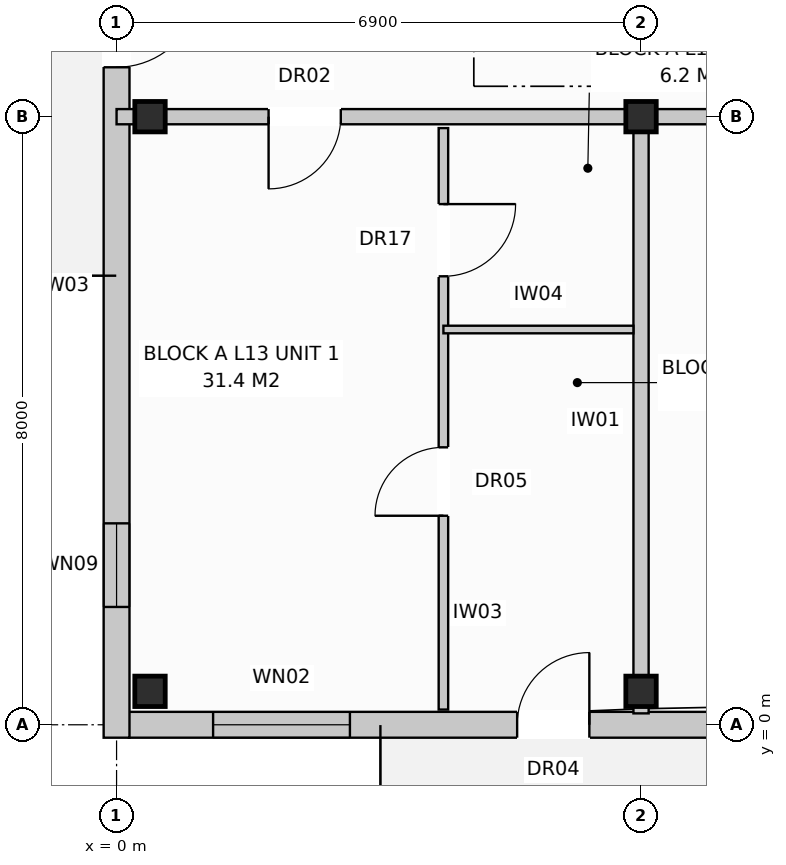
"""IFC4 building model, lengths in metres.
Left out: names, types, materials, properties, quantities, classifications, styles, units other than length and angle.
Written with IfcOpenShell. Run it as: python <this file> out.ifc"""

import sys

from ifc_helpers import new_model, si_unit, direction, frame, frame_2d, origin, origin_with_axes, origin_2d, place, context, subcontext, project, spatial, rectangle, extrude, element, fill, save


model = new_model("IFC4")
c1 = context("Model", 3, precision=1e-05, world=origin(), true_north=direction((0.0, 1.0)))
c2 = subcontext(c1, "Body", "Model", "MODEL_VIEW")
j1 = project(units=[si_unit("LENGTHUNIT", "METRE"), si_unit("PLANEANGLEUNIT", "RADIAN")], contexts=[c1])
p1 = place(None, origin())
s1 = spatial("IfcSite", under=j1, at=p1, CompositionType="ELEMENT")
p2 = place(p1, origin())
s2 = spatial("IfcBuilding", under=s1, at=p2, CompositionType="ELEMENT")
p3 = place(p2, frame((0.0, 0.0, 43.2)))
s3 = spatial("IfcBuildingStorey", under=s2, at=p3, CompositionType="ELEMENT", Elevation=43.2)
for number, where, z_axis, x_axis in (
    (1, (0.44, 0.44, 0.0), (0.0, 0.0, 1.0), (1.0, 0.0, 0.0)),
    (2, (0.44, 8.0, 0.0), (0.0, 0.0, 1.0), (1.0, 0.0, 0.0)),
    (3, (6.9, 0.44, 0.0), (0.0, 0.0, 1.0), (1.0, 0.0, 0.0)),
    (4, (6.9, 8.0, 0.0), (0.0, 0.0, 1.0), (1.0, 0.0, 0.0)),
):
    element("IfcColumn", number, at=place(p3, frame(where, z_axis=z_axis, x_axis=x_axis)), inside=s3, PredefinedType="COLUMN", context=c2, shape_type="SweptSolid", body=[
        extrude(rectangle(XDim=0.4, YDim=0.4, at=origin_2d()), origin(), (0.0, 0.0, 1.0), 3.2),
    ])
p4 = place(p3, frame((0.16, 0.0, 0.0), z_axis=(0.0, 0.0, 1.0), x_axis=(1.0, 0.0, 0.0)))
e5 = element("IfcWall", 5, at=p4, inside=s3, PredefinedType="STANDARD", context=c2, shape_type="SweptSolid", body=[
    extrude(rectangle(XDim=41.08, YDim=0.34, at=frame_2d((20.54, 0.0))), origin(), (0.0, 0.0, 1.0), 2.97),
])
p5 = place(p4, frame((5.11, 0.0, 0.0)))
e6 = element("IfcOpeningElement", 6, at=p5, cuts=e5, PredefinedType="OPENING", context=c2, shape_type="SweptSolid", body=[
    extrude(rectangle(XDim=0.95, YDim=2.1, at=frame_2d((0.475, 1.05))), frame((0.0, 0.182, 0.0), z_axis=(0.0, -1.0, 0.0), x_axis=(1.0, 0.0, 0.0)), (0.0, 0.0, 1.0), 0.364),
])
p6 = place(p4, frame((18.91, 0.0, 0.0)))
e7 = element("IfcOpeningElement", 7, at=p6, cuts=e5, PredefinedType="OPENING", context=c2, shape_type="SweptSolid", body=[
    extrude(rectangle(XDim=0.95, YDim=2.1, at=frame_2d((0.475, 1.05))), frame((0.0, 0.182, 0.0), z_axis=(0.0, -1.0, 0.0), x_axis=(1.0, 0.0, 0.0)), (0.0, 0.0, 1.0), 0.364),
])
p7 = place(p4, frame((31.431, 0.0, 0.0)))
e8 = element("IfcOpeningElement", 8, at=p7, cuts=e5, PredefinedType="OPENING", context=c2, shape_type="SweptSolid", body=[
    extrude(rectangle(XDim=0.95, YDim=2.1, at=frame_2d((0.475, 1.05))), frame((0.0, 0.182, 0.0), z_axis=(0.0, -1.0, 0.0), x_axis=(1.0, 0.0, 0.0)), (0.0, 0.0, 1.0), 0.364),
])
p8 = place(p4, frame((1.11, 0.0, 0.8)))
e9 = element("IfcOpeningElement", 9, at=p8, cuts=e5, PredefinedType="OPENING", context=c2, shape_type="SweptSolid", body=[
    extrude(rectangle(XDim=1.8, YDim=1.7, at=frame_2d((0.9, 0.85))), frame((0.0, 0.182, 0.0), z_axis=(0.0, -1.0, 0.0), x_axis=(1.0, 0.0, 0.0)), (0.0, 0.0, 1.0), 0.364),
])
p9 = place(p4, frame((9.36, 0.0, 0.72)))
e10 = element("IfcOpeningElement", 10, at=p9, cuts=e5, PredefinedType="OPENING", context=c2, shape_type="SweptSolid", body=[
    extrude(rectangle(XDim=1.1, YDim=1.5, at=frame_2d((0.55, 0.75))), frame((0.0, 0.182, 0.0), z_axis=(0.0, -1.0, 0.0), x_axis=(1.0, 0.0, 0.0)), (0.0, 0.0, 1.0), 0.364),
])
p10 = place(p4, frame((14.635, 0.0, 0.8)))
e11 = element("IfcOpeningElement", 11, at=p10, cuts=e5, PredefinedType="OPENING", context=c2, shape_type="SweptSolid", body=[
    extrude(rectangle(XDim=1.95, YDim=1.65, at=frame_2d((0.975, 0.825))), frame((0.0, 0.182, 0.0), z_axis=(0.0, -1.0, 0.0), x_axis=(1.0, 0.0, 0.0)), (0.0, 0.0, 1.0), 0.364),
])
p11 = place(p4, frame((21.46, 0.0, 0.72)))
e12 = element("IfcOpeningElement", 12, at=p11, cuts=e5, PredefinedType="OPENING", context=c2, shape_type="SweptSolid", body=[
    extrude(rectangle(XDim=1.1, YDim=1.5, at=frame_2d((0.55, 0.75))), frame((0.0, 0.182, 0.0), z_axis=(0.0, -1.0, 0.0), x_axis=(1.0, 0.0, 0.0)), (0.0, 0.0, 1.0), 0.364),
])
p12 = place(p4, frame((24.46, 0.0, 0.8)))
e13 = element("IfcOpeningElement", 13, at=p12, cuts=e5, PredefinedType="OPENING", context=c2, shape_type="SweptSolid", body=[
    extrude(rectangle(XDim=1.9, YDim=1.85, at=frame_2d((0.95, 0.925))), frame((0.0, 0.182, 0.0), z_axis=(0.0, -1.0, 0.0), x_axis=(1.0, 0.0, 0.0)), (0.0, 0.0, 1.0), 0.364),
])
p13 = place(p4, frame((29.135, 0.0, 0.8)))
e14 = element("IfcOpeningElement", 14, at=p13, cuts=e5, PredefinedType="OPENING", context=c2, shape_type="SweptSolid", body=[
    extrude(rectangle(XDim=1.95, YDim=1.65, at=frame_2d((0.975, 0.825))), frame((0.0, 0.182, 0.0), z_axis=(0.0, -1.0, 0.0), x_axis=(1.0, 0.0, 0.0)), (0.0, 0.0, 1.0), 0.364),
])
p14 = place(p4, frame((35.26, 0.0, 0.72)))
e15 = element("IfcOpeningElement", 15, at=p14, cuts=e5, PredefinedType="OPENING", context=c2, shape_type="SweptSolid", body=[
    extrude(rectangle(XDim=1.1, YDim=1.5, at=frame_2d((0.55, 0.75))), frame((0.0, 0.182, 0.0), z_axis=(0.0, -1.0, 0.0), x_axis=(1.0, 0.0, 0.0)), (0.0, 0.0, 1.0), 0.364),
])
p15 = place(p4, frame((38.06, 0.0, 0.8)))
e16 = element("IfcOpeningElement", 16, at=p15, cuts=e5, PredefinedType="OPENING", context=c2, shape_type="SweptSolid", body=[
    extrude(rectangle(XDim=1.9, YDim=1.85, at=frame_2d((0.95, 0.925))), frame((0.0, 0.182, 0.0), z_axis=(0.0, -1.0, 0.0), x_axis=(1.0, 0.0, 0.0)), (0.0, 0.0, 1.0), 0.364),
])
p16 = place(p3, frame((0.0, -0.17, 0.0), z_axis=(0.0, 0.0, 1.0), x_axis=(0.0, 1.0, 0.0)))
e17 = element("IfcWall", 17, at=p16, inside=s3, PredefinedType="STANDARD", context=c2, shape_type="SweptSolid", body=[
    extrude(rectangle(XDim=18.74, YDim=0.34, at=frame_2d((9.37, 0.0))), origin(), (0.0, 0.0, 1.0), 2.97),
])
p17 = place(p16, frame((8.82, 0.0, 0.0)))
e18 = element("IfcOpeningElement", 18, at=p17, cuts=e17, PredefinedType="OPENING", context=c2, shape_type="SweptSolid", body=[
    extrude(rectangle(XDim=1.1, YDim=2.1, at=frame_2d((0.55, 1.05))), frame((0.0, 0.182, 0.0), z_axis=(0.0, -1.0, 0.0), x_axis=(1.0, 0.0, 0.0)), (0.0, 0.0, 1.0), 0.364),
])
p18 = place(p16, frame((1.72, 0.0, 0.72)))
e19 = element("IfcOpeningElement", 19, at=p18, cuts=e17, PredefinedType="OPENING", context=c2, shape_type="SweptSolid", body=[
    extrude(rectangle(XDim=1.1, YDim=1.5, at=frame_2d((0.55, 0.75))), frame((0.0, 0.182, 0.0), z_axis=(0.0, -1.0, 0.0), x_axis=(1.0, 0.0, 0.0)), (0.0, 0.0, 1.0), 0.364),
])
p19 = place(p16, frame((15.92, 0.0, 0.72)))
e20 = element("IfcOpeningElement", 20, at=p19, cuts=e17, PredefinedType="OPENING", context=c2, shape_type="SweptSolid", body=[
    extrude(rectangle(XDim=1.1, YDim=1.5, at=frame_2d((0.55, 0.75))), frame((0.0, 0.182, 0.0), z_axis=(0.0, -1.0, 0.0), x_axis=(1.0, 0.0, 0.0)), (0.0, 0.0, 1.0), 0.364),
])
p20 = place(p3, frame((6.9, 7.85, 0.0), z_axis=(0.0, 0.0, 1.0), x_axis=(0.0, -1.0, 0.0)))
e21 = element("IfcWall", 21, at=p20, inside=s3, PredefinedType="PARTITIONING", context=c2, shape_type="SweptSolid", body=[
    extrude(rectangle(XDim=7.7, YDim=0.2, at=frame_2d((3.85, 0.0))), origin(), (0.0, 0.0, 1.0), 2.41),
])
p21 = place(p3, frame((0.0, 8.0, 0.0), z_axis=(0.0, 0.0, 1.0), x_axis=(1.0, 0.0, 0.0)))
e22 = element("IfcWall", 22, at=p21, inside=s3, PredefinedType="PARTITIONING", context=c2, shape_type="SweptSolid", body=[
    extrude(rectangle(XDim=6.9, YDim=0.2, at=frame_2d((3.45, 0.0))), origin(), (0.0, 0.0, 1.0), 2.41),
])
p22 = place(p21, frame((2.0, 0.0, 0.0)))
e23 = element("IfcOpeningElement", 23, at=p22, cuts=e22, PredefinedType="OPENING", context=c2, shape_type="SweptSolid", body=[
    extrude(rectangle(XDim=0.95, YDim=2.15, at=frame_2d((0.475, 1.075))), frame((0.0, 0.112, 0.0), z_axis=(0.0, -1.0, 0.0), x_axis=(1.0, 0.0, 0.0)), (0.0, 0.0, 1.0), 0.224),
])
p23 = place(p3, frame((4.3, 7.85, 0.0), z_axis=(0.0, 0.0, 1.0), x_axis=(0.0, -1.0, 0.0)))
e24 = element("IfcWall", 24, at=p23, inside=s3, PredefinedType="PARTITIONING", context=c2, shape_type="SweptSolid", body=[
    extrude(rectangle(XDim=7.65, YDim=0.125, at=frame_2d((3.825, 0.0))), origin(), (0.0, 0.0, 1.0), 2.59),
])
p24 = place(p23, frame((1.0, 0.0, 0.0)))
e25 = element("IfcOpeningElement", 25, at=p24, cuts=e24, PredefinedType="OPENING", context=c2, shape_type="SweptSolid", body=[
    extrude(rectangle(XDim=0.95, YDim=2.1, at=frame_2d((0.475, 1.05))), frame((0.0, 0.074, 0.0), z_axis=(0.0, -1.0, 0.0), x_axis=(1.0, 0.0, 0.0)), (0.0, 0.0, 1.0), 0.149),
])
p25 = place(p23, frame((4.2, 0.0, 0.0)))
e26 = element("IfcOpeningElement", 26, at=p25, cuts=e24, PredefinedType="OPENING", context=c2, shape_type="SweptSolid", body=[
    extrude(rectangle(XDim=0.9, YDim=2.1, at=frame_2d((0.45, 1.05))), frame((0.0, 0.074, 0.0), z_axis=(0.0, -1.0, 0.0), x_axis=(1.0, 0.0, 0.0)), (0.0, 0.0, 1.0), 0.149),
])
p26 = place(p3, frame((4.3, 5.2, 0.0), z_axis=(0.0, 0.0, 1.0), x_axis=(1.0, 0.0, 0.0)))
e27 = element("IfcWall", 27, at=p26, inside=s3, PredefinedType="PARTITIONING", context=c2, shape_type="SweptSolid", body=[
    extrude(rectangle(XDim=2.5, YDim=0.1, at=frame_2d((1.25, 0.0))), origin(), (0.0, 0.0, 1.0), 2.97),
])
p27 = place(p3, frame((6.9, 8.0, 0.0), z_axis=(0.0, 0.0, 1.0), x_axis=(1.0, 0.0, 0.0)))
e28 = element("IfcWall", 28, at=p27, inside=s3, PredefinedType="PARTITIONING", context=c2, shape_type="SweptSolid", body=[
    extrude(rectangle(XDim=20.7, YDim=0.2, at=frame_2d((10.35, 0.0))), origin(), (0.0, 0.0, 1.0), 2.41),
])
p28 = place(p27, frame((2.4, 0.0, 0.0)))
e29 = element("IfcOpeningElement", 29, at=p28, cuts=e28, PredefinedType="OPENING", context=c2, shape_type="SweptSolid", body=[
    extrude(rectangle(XDim=0.95, YDim=2.15, at=frame_2d((0.475, 1.075))), frame((0.0, 0.112, 0.0), z_axis=(0.0, -1.0, 0.0), x_axis=(1.0, 0.0, 0.0)), (0.0, 0.0, 1.0), 0.224),
])
p29 = place(p5, origin_with_axes())
e30 = element("IfcDoor", 30, at=p29, inside=s3, OperationType="SINGLE_SWING_RIGHT", PredefinedType="DOOR", context=c2, shape_type="SweptSolid", body=[
    extrude(rectangle(XDim=0.95, YDim=2.1, at=frame_2d((0.475, 1.05))), frame((0.0, 0.025, 0.0), z_axis=(0.0, -1.0, 0.0), x_axis=(1.0, 0.0, 0.0)), (0.0, 0.0, 1.0), 0.05),
])
fill(e6, e30)
p30 = place(p8, origin_with_axes())
e31 = element("IfcWindow", 31, at=p30, inside=s3, PartitioningType="SINGLE_PANEL", PredefinedType="WINDOW", context=c2, shape_type="SweptSolid", body=[
    extrude(rectangle(XDim=1.8, YDim=1.7, at=frame_2d((0.9, 0.85))), frame((0.0, 0.03, 0.0), z_axis=(0.0, -1.0, 0.0), x_axis=(1.0, 0.0, 0.0)), (0.0, 0.0, 1.0), 0.06),
])
fill(e9, e31)
p31 = place(p17, frame((1.1, 0.0, 0.0), z_axis=(0.0, 0.0, 1.0), x_axis=(-1.0, 0.0, 0.0)))
e32 = element("IfcDoor", 32, at=p31, inside=s3, OperationType="SINGLE_SWING_RIGHT", PredefinedType="DOOR", context=c2, shape_type="SweptSolid", body=[
    extrude(rectangle(XDim=1.1, YDim=2.1, at=frame_2d((0.55, 1.05))), frame((0.0, 0.025, 0.0), z_axis=(0.0, -1.0, 0.0), x_axis=(1.0, 0.0, 0.0)), (0.0, 0.0, 1.0), 0.05),
])
fill(e18, e32)
p32 = place(p18, origin_with_axes())
e33 = element("IfcWindow", 33, at=p32, inside=s3, PartitioningType="SINGLE_PANEL", PredefinedType="WINDOW", context=c2, shape_type="SweptSolid", body=[
    extrude(rectangle(XDim=1.1, YDim=1.5, at=frame_2d((0.55, 0.75))), frame((0.0, 0.03, 0.0), z_axis=(0.0, -1.0, 0.0), x_axis=(1.0, 0.0, 0.0)), (0.0, 0.0, 1.0), 0.06),
])
fill(e19, e33)
p33 = place(p22, frame((0.95, 0.0, 0.0), z_axis=(0.0, 0.0, 1.0), x_axis=(-1.0, 0.0, 0.0)))
e34 = element("IfcDoor", 34, at=p33, inside=s3, OperationType="SINGLE_SWING_LEFT", PredefinedType="DOOR", context=c2, shape_type="SweptSolid", body=[
    extrude(rectangle(XDim=0.95, YDim=2.15, at=frame_2d((0.475, 1.075))), frame((0.0, 0.025, 0.0), z_axis=(0.0, -1.0, 0.0), x_axis=(1.0, 0.0, 0.0)), (0.0, 0.0, 1.0), 0.05),
])
fill(e23, e34)
p34 = place(p24, origin_with_axes())
e35 = element("IfcDoor", 35, at=p34, inside=s3, OperationType="SINGLE_SWING_LEFT", PredefinedType="DOOR", context=c2, shape_type="SweptSolid", body=[
    extrude(rectangle(XDim=0.95, YDim=2.1, at=frame_2d((0.475, 1.05))), frame((0.0, 0.025, 0.0), z_axis=(0.0, -1.0, 0.0), x_axis=(1.0, 0.0, 0.0)), (0.0, 0.0, 1.0), 0.05),
])
fill(e25, e35)
p35 = place(p25, frame((0.9, 0.0, 0.0), z_axis=(0.0, 0.0, 1.0), x_axis=(-1.0, 0.0, 0.0)))
e36 = element("IfcDoor", 36, at=p35, inside=s3, OperationType="SINGLE_SWING_RIGHT", PredefinedType="DOOR", context=c2, shape_type="SweptSolid", body=[
    extrude(rectangle(XDim=0.9, YDim=2.1, at=frame_2d((0.45, 1.05))), frame((0.0, 0.025, 0.0), z_axis=(0.0, -1.0, 0.0), x_axis=(1.0, 0.0, 0.0)), (0.0, 0.0, 1.0), 0.05),
])
fill(e26, e36)
save(model, sys.argv[1])
